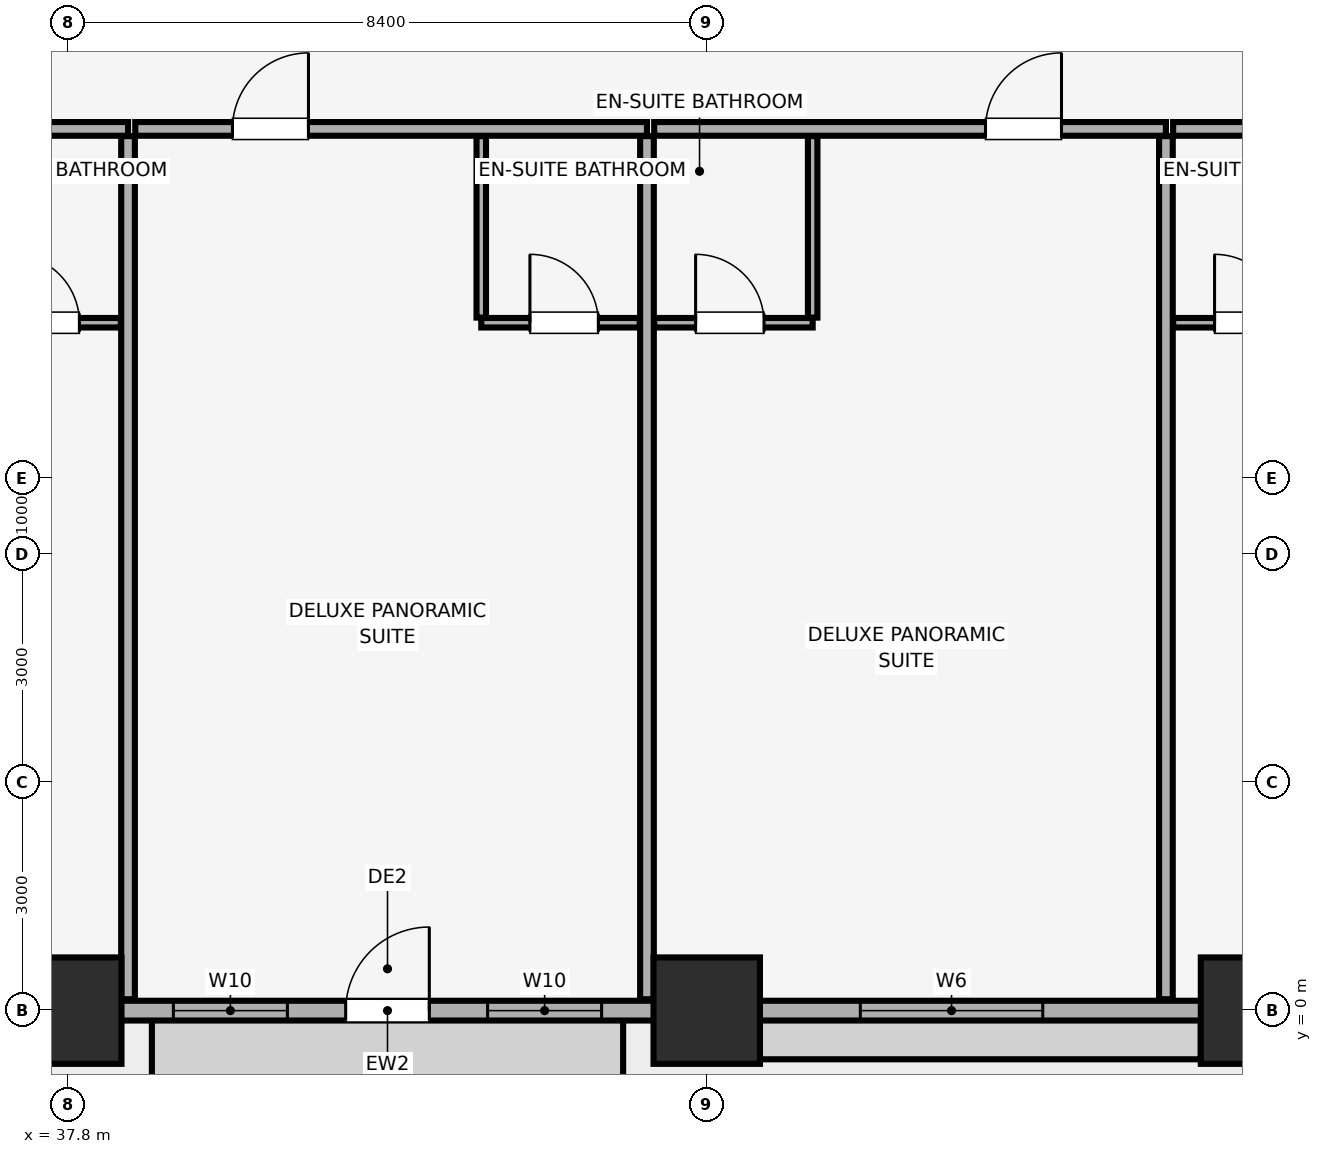
"""IFC4 building model, lengths in metres.
Left out: names, types, materials, properties, quantities, classifications, styles, units other than length and angle.
Written with IfcOpenShell. Run it as: python <this file> out.ifc"""

import sys

from ifc_helpers import new_model, si_unit, direction, frame, frame_2d, origin, origin_2d, place, context, subcontext, project, spatial, rectangle, extrude, element, fill, save


model = new_model("IFC4")
c1 = context("Model", 3, precision=1e-05, world=origin(), true_north=direction((0.0, 1.0)))
c2 = subcontext(c1, "Body", "Model", "MODEL_VIEW")
j1 = project(units=[si_unit("LENGTHUNIT", "METRE"), si_unit("PLANEANGLEUNIT", "RADIAN")], contexts=[c1])
p1 = place(None, origin())
s1 = spatial("IfcSite", under=j1, at=p1, CompositionType="ELEMENT")
p2 = place(p1, origin())
s2 = spatial("IfcBuilding", under=s1, at=p2, CompositionType="ELEMENT")
p3 = place(p2, frame((0.0, 0.0, 57.65)))
s3 = spatial("IfcBuildingStorey", under=s2, at=p3, CompositionType="ELEMENT", Elevation=57.65)
for number, where, z_axis, x_axis in (
    (1, (37.8, 0.0, 0.0), (0.0, 0.0, 1.0), (1.0, 0.0, 0.0)),
    (2, (46.2, 0.0, 0.0), (0.0, 0.0, 1.0), (1.0, 0.0, 0.0)),
    (3, (53.4, 0.0, 0.0), (0.0, 0.0, 1.0), (1.0, 0.0, 0.0)),
):
    element("IfcColumn", number, at=place(p3, frame(where, z_axis=z_axis, x_axis=x_axis)), inside=s3, PredefinedType="COLUMN", context=c2, shape_type="SweptSolid", body=[
        extrude(rectangle(XDim=1.4, YDim=1.4, at=origin_2d()), origin(), (0.0, 0.0, 1.0), 3.51),
    ])
p4 = place(p3, frame((4.2, 0.0, 0.0), z_axis=(0.0, 0.0, 1.0), x_axis=(1.0, 0.0, 0.0)))
e4 = element("IfcWall", 4, at=p4, inside=s3, PredefinedType="SOLIDWALL", context=c2, shape_type="SweptSolid", body=[
    extrude(rectangle(XDim=75.6, YDim=0.26, at=frame_2d((37.8, 0.0))), origin(), (0.0, 0.0, 1.0), 2.56),
])
p5 = place(p4, frame((21.383, 0.0, 0.0)))
e5 = element("IfcOpeningElement", 5, at=p5, cuts=e4, PredefinedType="OPENING", context=c2, shape_type="SweptSolid", body=[
    extrude(rectangle(XDim=1.1, YDim=2.15, at=frame_2d((0.55, 1.075))), frame((0.0, 0.14, 0.0), z_axis=(0.0, -1.0, 0.0), x_axis=(1.0, 0.0, 0.0)), (0.0, 0.0, 1.0), 0.28),
])
p6 = place(p4, frame((37.25, 0.0, 0.0)))
e6 = element("IfcOpeningElement", 6, at=p6, cuts=e4, PredefinedType="OPENING", context=c2, shape_type="SweptSolid", body=[
    extrude(rectangle(XDim=1.1, YDim=2.15, at=frame_2d((0.55, 1.075))), frame((0.0, 0.14, 0.0), z_axis=(0.0, -1.0, 0.0), x_axis=(1.0, 0.0, 0.0)), (0.0, 0.0, 1.0), 0.28),
])
p7 = place(p4, frame((53.117, 0.0, 0.0)))
e7 = element("IfcOpeningElement", 7, at=p7, cuts=e4, PredefinedType="OPENING", context=c2, shape_type="SweptSolid", body=[
    extrude(rectangle(XDim=1.1, YDim=2.15, at=frame_2d((0.55, 1.075))), frame((0.0, 0.14, 0.0), z_axis=(0.0, -1.0, 0.0), x_axis=(1.0, 0.0, 0.0)), (0.0, 0.0, 1.0), 0.28),
])
p8 = place(p4, frame((1.035, 0.0, 0.85)))
e8 = element("IfcOpeningElement", 8, at=p8, cuts=e4, PredefinedType="OPENING", context=c2, shape_type="SweptSolid", body=[
    extrude(rectangle(XDim=2.4, YDim=1.5, at=frame_2d((1.2, 0.75))), frame((0.0, 0.14, 0.0), z_axis=(0.0, -1.0, 0.0), x_axis=(1.0, 0.0, 0.0)), (0.0, 0.0, 1.0), 0.28),
])
p9 = place(p4, frame((8.138, 0.0, 0.85)))
e9 = element("IfcOpeningElement", 9, at=p9, cuts=e4, PredefinedType="OPENING", context=c2, shape_type="SweptSolid", body=[
    extrude(rectangle(XDim=2.4, YDim=1.5, at=frame_2d((1.2, 0.75))), frame((0.0, 0.14, 0.0), z_axis=(0.0, -1.0, 0.0), x_axis=(1.0, 0.0, 0.0)), (0.0, 0.0, 1.0), 0.28),
])
p10 = place(p4, frame((15.153, 0.0, 0.85)))
e10 = element("IfcOpeningElement", 10, at=p10, cuts=e4, PredefinedType="OPENING", context=c2, shape_type="SweptSolid", body=[
    extrude(rectangle(XDim=2.4, YDim=1.5, at=frame_2d((1.2, 0.75))), frame((0.0, 0.14, 0.0), z_axis=(0.0, -1.0, 0.0), x_axis=(1.0, 0.0, 0.0)), (0.0, 0.0, 1.0), 0.28),
])
p11 = place(p4, frame((23.127, 0.0, 0.85)))
e11 = element("IfcOpeningElement", 11, at=p11, cuts=e4, PredefinedType="OPENING", context=c2, shape_type="SweptSolid", body=[
    extrude(rectangle(XDim=2.4, YDim=1.5, at=frame_2d((1.2, 0.75))), frame((0.0, 0.14, 0.0), z_axis=(0.0, -1.0, 0.0), x_axis=(1.0, 0.0, 0.0)), (0.0, 0.0, 1.0), 0.28),
])
p12 = place(p4, frame((29.179, 0.0, 0.85)))
e12 = element("IfcOpeningElement", 12, at=p12, cuts=e4, PredefinedType="OPENING", context=c2, shape_type="SweptSolid", body=[
    extrude(rectangle(XDim=2.4, YDim=1.5, at=frame_2d((1.2, 0.75))), frame((0.0, 0.14, 0.0), z_axis=(0.0, -1.0, 0.0), x_axis=(1.0, 0.0, 0.0)), (0.0, 0.0, 1.0), 0.28),
])
p13 = place(p4, frame((34.983, 0.0, 0.85)))
e13 = element("IfcOpeningElement", 13, at=p13, cuts=e4, PredefinedType="OPENING", context=c2, shape_type="SweptSolid", body=[
    extrude(rectangle(XDim=1.5, YDim=1.4, at=frame_2d((0.75, 0.7))), frame((0.0, 0.14, 0.0), z_axis=(0.0, -1.0, 0.0), x_axis=(1.0, 0.0, 0.0)), (0.0, 0.0, 1.0), 0.28),
])
p14 = place(p4, frame((39.117, 0.0, 0.85)))
e14 = element("IfcOpeningElement", 14, at=p14, cuts=e4, PredefinedType="OPENING", context=c2, shape_type="SweptSolid", body=[
    extrude(rectangle(XDim=1.5, YDim=1.4, at=frame_2d((0.75, 0.7))), frame((0.0, 0.14, 0.0), z_axis=(0.0, -1.0, 0.0), x_axis=(1.0, 0.0, 0.0)), (0.0, 0.0, 1.0), 0.28),
])
p15 = place(p4, frame((44.021, 0.0, 0.85)))
e15 = element("IfcOpeningElement", 15, at=p15, cuts=e4, PredefinedType="OPENING", context=c2, shape_type="SweptSolid", body=[
    extrude(rectangle(XDim=2.4, YDim=1.5, at=frame_2d((1.2, 0.75))), frame((0.0, 0.14, 0.0), z_axis=(0.0, -1.0, 0.0), x_axis=(1.0, 0.0, 0.0)), (0.0, 0.0, 1.0), 0.28),
])
p16 = place(p4, frame((50.073, 0.0, 0.85)))
e16 = element("IfcOpeningElement", 16, at=p16, cuts=e4, PredefinedType="OPENING", context=c2, shape_type="SweptSolid", body=[
    extrude(rectangle(XDim=2.4, YDim=1.5, at=frame_2d((1.2, 0.75))), frame((0.0, 0.14, 0.0), z_axis=(0.0, -1.0, 0.0), x_axis=(1.0, 0.0, 0.0)), (0.0, 0.0, 1.0), 0.28),
])
p17 = place(p4, frame((58.048, 0.0, 0.85)))
e17 = element("IfcOpeningElement", 17, at=p17, cuts=e4, PredefinedType="OPENING", context=c2, shape_type="SweptSolid", body=[
    extrude(rectangle(XDim=2.4, YDim=1.5, at=frame_2d((1.2, 0.75))), frame((0.0, 0.14, 0.0), z_axis=(0.0, -1.0, 0.0), x_axis=(1.0, 0.0, 0.0)), (0.0, 0.0, 1.0), 0.28),
])
p18 = place(p4, frame((65.062, 0.0, 0.85)))
e18 = element("IfcOpeningElement", 18, at=p18, cuts=e4, PredefinedType="OPENING", context=c2, shape_type="SweptSolid", body=[
    extrude(rectangle(XDim=2.4, YDim=1.5, at=frame_2d((1.2, 0.75))), frame((0.0, 0.14, 0.0), z_axis=(0.0, -1.0, 0.0), x_axis=(1.0, 0.0, 0.0)), (0.0, 0.0, 1.0), 0.28),
])
p19 = place(p4, frame((72.165, 0.0, 0.85)))
e19 = element("IfcOpeningElement", 19, at=p19, cuts=e4, PredefinedType="OPENING", context=c2, shape_type="SweptSolid", body=[
    extrude(rectangle(XDim=2.4, YDim=1.5, at=frame_2d((1.2, 0.75))), frame((0.0, 0.14, 0.0), z_axis=(0.0, -1.0, 0.0), x_axis=(1.0, 0.0, 0.0)), (0.0, 0.0, 1.0), 0.28),
])
p20 = place(p3, frame((31.854, 11.6, 0.0), z_axis=(0.0, 0.0, 1.0), x_axis=(1.0, 0.0, 0.0)))
e20 = element("IfcWall", 20, at=p20, inside=s3, PredefinedType="PARTITIONING", context=c2, shape_type="SweptSolid", body=[
    extrude(rectangle(XDim=6.732, YDim=0.18, at=frame_2d((3.366, 0.0))), origin(), (0.0, 0.0, 1.0), 3.51),
])
p21 = place(p20, frame((1.279, 0.0, 0.0)))
e21 = element("IfcOpeningElement", 21, at=p21, cuts=e20, PredefinedType="OPENING", context=c2, shape_type="SweptSolid", body=[
    extrude(rectangle(XDim=1.0, YDim=2.15, at=frame_2d((0.5, 1.075))), frame((0.0, 0.1, 0.0), z_axis=(0.0, -1.0, 0.0), x_axis=(1.0, 0.0, 0.0)), (0.0, 0.0, 1.0), 0.2),
])
p22 = place(p3, frame((38.586, 0.15, 0.0), z_axis=(0.0, 0.0, 1.0), x_axis=(0.0, 1.0, 0.0)))
e22 = element("IfcWall", 22, at=p22, inside=s3, PredefinedType="PARTITIONING", context=c2, shape_type="SweptSolid", body=[
    extrude(rectangle(XDim=11.355, YDim=0.18, at=frame_2d((5.677, 0.0))), origin(), (0.0, 0.0, 1.0), 3.51),
])
p23 = place(p3, frame((36.406, 9.05, 0.0), z_axis=(0.0, 0.0, 1.0), x_axis=(1.0, 0.0, 0.0)))
e23 = element("IfcWall", 23, at=p23, inside=s3, PredefinedType="PARTITIONING", context=c2, shape_type="SweptSolid", body=[
    extrude(rectangle(XDim=2.085, YDim=0.125, at=frame_2d((1.042, 0.0))), origin(), (0.0, 0.0, 1.0), 3.51),
])
p24 = place(p23, frame((0.64, 0.0, 0.0)))
e24 = element("IfcOpeningElement", 24, at=p24, cuts=e23, PredefinedType="OPENING", context=c2, shape_type="SweptSolid", body=[
    extrude(rectangle(XDim=0.9, YDim=2.1, at=frame_2d((0.45, 1.05))), frame((0.0, 0.073, 0.0), z_axis=(0.0, -1.0, 0.0), x_axis=(1.0, 0.0, 0.0)), (0.0, 0.0, 1.0), 0.145),
])
p25 = place(p3, frame((38.681, 11.6, 0.0), z_axis=(0.0, 0.0, 1.0), x_axis=(1.0, 0.0, 0.0)))
e25 = element("IfcWall", 25, at=p25, inside=s3, PredefinedType="PARTITIONING", context=c2, shape_type="SweptSolid", body=[
    extrude(rectangle(XDim=6.732, YDim=0.18, at=frame_2d((3.366, 0.0))), origin(), (0.0, 0.0, 1.0), 3.51),
])
p26 = place(p25, frame((1.279, 0.0, 0.0)))
e26 = element("IfcOpeningElement", 26, at=p26, cuts=e25, PredefinedType="OPENING", context=c2, shape_type="SweptSolid", body=[
    extrude(rectangle(XDim=1.0, YDim=2.15, at=frame_2d((0.5, 1.075))), frame((0.0, 0.1, 0.0), z_axis=(0.0, -1.0, 0.0), x_axis=(1.0, 0.0, 0.0)), (0.0, 0.0, 1.0), 0.2),
])
p27 = place(p3, frame((45.414, 0.15, 0.0), z_axis=(0.0, 0.0, 1.0), x_axis=(0.0, 1.0, 0.0)))
e27 = element("IfcWall", 27, at=p27, inside=s3, PredefinedType="PARTITIONING", context=c2, shape_type="SweptSolid", body=[
    extrude(rectangle(XDim=11.355, YDim=0.18, at=frame_2d((5.677, 0.0))), origin(), (0.0, 0.0, 1.0), 3.51),
])
p28 = place(p3, frame((43.234, 9.05, 0.0), z_axis=(0.0, 0.0, 1.0), x_axis=(1.0, 0.0, 0.0)))
e28 = element("IfcWall", 28, at=p28, inside=s3, PredefinedType="PARTITIONING", context=c2, shape_type="SweptSolid", body=[
    extrude(rectangle(XDim=2.085, YDim=0.125, at=frame_2d((1.042, 0.0))), origin(), (0.0, 0.0, 1.0), 3.51),
])
p29 = place(p28, frame((0.64, 0.0, 0.0)))
e29 = element("IfcOpeningElement", 29, at=p29, cuts=e28, PredefinedType="OPENING", context=c2, shape_type="SweptSolid", body=[
    extrude(rectangle(XDim=0.9, YDim=2.1, at=frame_2d((0.45, 1.05))), frame((0.0, 0.073, 0.0), z_axis=(0.0, -1.0, 0.0), x_axis=(1.0, 0.0, 0.0)), (0.0, 0.0, 1.0), 0.145),
])
p30 = place(p3, frame((43.234, 9.117, 0.0), z_axis=(0.0, 0.0, 1.0), x_axis=(0.0, 1.0, 0.0)))
e30 = element("IfcWall", 30, at=p30, inside=s3, PredefinedType="PARTITIONING", context=c2, shape_type="SweptSolid", body=[
    extrude(rectangle(XDim=2.387, YDim=0.125, at=frame_2d((1.194, 0.0))), origin(), (0.0, 0.0, 1.0), 3.51),
])
p31 = place(p3, frame((45.509, 11.6, 0.0), z_axis=(0.0, 0.0, 1.0), x_axis=(1.0, 0.0, 0.0)))
e31 = element("IfcWall", 31, at=p31, inside=s3, PredefinedType="PARTITIONING", context=c2, shape_type="SweptSolid", body=[
    extrude(rectangle(XDim=6.732, YDim=0.18, at=frame_2d((3.366, 0.0))), origin(), (0.0, 0.0, 1.0), 3.51),
])
p32 = place(p31, frame((4.359, 0.0, 0.0)))
e32 = element("IfcOpeningElement", 32, at=p32, cuts=e31, PredefinedType="OPENING", context=c2, shape_type="SweptSolid", body=[
    extrude(rectangle(XDim=1.0, YDim=2.15, at=frame_2d((0.5, 1.075))), frame((0.0, 0.1, 0.0), z_axis=(0.0, -1.0, 0.0), x_axis=(1.0, 0.0, 0.0)), (0.0, 0.0, 1.0), 0.2),
])
p33 = place(p3, frame((52.241, 0.15, 0.0), z_axis=(0.0, 0.0, 1.0), x_axis=(0.0, 1.0, 0.0)))
e33 = element("IfcWall", 33, at=p33, inside=s3, PredefinedType="PARTITIONING", context=c2, shape_type="SweptSolid", body=[
    extrude(rectangle(XDim=11.355, YDim=0.18, at=frame_2d((5.677, 0.0))), origin(), (0.0, 0.0, 1.0), 3.51),
])
p34 = place(p3, frame((45.509, 9.05, 0.0), z_axis=(0.0, 0.0, 1.0), x_axis=(1.0, 0.0, 0.0)))
e34 = element("IfcWall", 34, at=p34, inside=s3, PredefinedType="PARTITIONING", context=c2, shape_type="SweptSolid", body=[
    extrude(rectangle(XDim=2.085, YDim=0.125, at=frame_2d((1.042, 0.0))), origin(), (0.0, 0.0, 1.0), 3.51),
])
p35 = place(p34, frame((0.545, 0.0, 0.0)))
e35 = element("IfcOpeningElement", 35, at=p35, cuts=e34, PredefinedType="OPENING", context=c2, shape_type="SweptSolid", body=[
    extrude(rectangle(XDim=0.9, YDim=2.1, at=frame_2d((0.45, 1.05))), frame((0.0, 0.073, 0.0), z_axis=(0.0, -1.0, 0.0), x_axis=(1.0, 0.0, 0.0)), (0.0, 0.0, 1.0), 0.145),
])
p36 = place(p3, frame((47.594, 9.117, 0.0), z_axis=(0.0, 0.0, 1.0), x_axis=(0.0, 1.0, 0.0)))
e36 = element("IfcWall", 36, at=p36, inside=s3, PredefinedType="PARTITIONING", context=c2, shape_type="SweptSolid", body=[
    extrude(rectangle(XDim=2.387, YDim=0.125, at=frame_2d((1.194, 0.0))), origin(), (0.0, 0.0, 1.0), 3.51),
])
p37 = place(p3, frame((52.336, 11.6, 0.0), z_axis=(0.0, 0.0, 1.0), x_axis=(1.0, 0.0, 0.0)))
e37 = element("IfcWall", 37, at=p37, inside=s3, PredefinedType="PARTITIONING", context=c2, shape_type="SweptSolid", body=[
    extrude(rectangle(XDim=6.732, YDim=0.18, at=frame_2d((3.366, 0.0))), origin(), (0.0, 0.0, 1.0), 3.51),
])
p38 = place(p37, frame((4.359, 0.0, 0.0)))
e38 = element("IfcOpeningElement", 38, at=p38, cuts=e37, PredefinedType="OPENING", context=c2, shape_type="SweptSolid", body=[
    extrude(rectangle(XDim=1.0, YDim=2.15, at=frame_2d((0.5, 1.075))), frame((0.0, 0.1, 0.0), z_axis=(0.0, -1.0, 0.0), x_axis=(1.0, 0.0, 0.0)), (0.0, 0.0, 1.0), 0.2),
])
p39 = place(p3, frame((52.336, 9.05, 0.0), z_axis=(0.0, 0.0, 1.0), x_axis=(1.0, 0.0, 0.0)))
e39 = element("IfcWall", 39, at=p39, inside=s3, PredefinedType="PARTITIONING", context=c2, shape_type="SweptSolid", body=[
    extrude(rectangle(XDim=2.085, YDim=0.125, at=frame_2d((1.042, 0.0))), origin(), (0.0, 0.0, 1.0), 3.51),
])
p40 = place(p39, frame((0.545, 0.0, 0.0)))
e40 = element("IfcOpeningElement", 40, at=p40, cuts=e39, PredefinedType="OPENING", context=c2, shape_type="SweptSolid", body=[
    extrude(rectangle(XDim=0.9, YDim=2.1, at=frame_2d((0.45, 1.05))), frame((0.0, 0.073, 0.0), z_axis=(0.0, -1.0, 0.0), x_axis=(1.0, 0.0, 0.0)), (0.0, 0.0, 1.0), 0.145),
])
p41 = place(p6, origin())
e41 = element("IfcDoor", 41, at=p41, inside=s3, OperationType="SINGLE_SWING_RIGHT", PredefinedType="DOOR", context=c2, shape_type="SweptSolid", body=[
    extrude(rectangle(XDim=1.1, YDim=2.15, at=frame_2d((0.55, 1.075))), frame((0.0, 0.025, 0.0), z_axis=(0.0, -1.0, 0.0), x_axis=(1.0, 0.0, 0.0)), (0.0, 0.0, 1.0), 0.05),
])
fill(e6, e41)
p42 = place(p13, origin())
e42 = element("IfcWindow", 42, at=p42, inside=s3, PartitioningType="SINGLE_PANEL", PredefinedType="WINDOW", context=c2, shape_type="SweptSolid", body=[
    extrude(rectangle(XDim=1.5, YDim=1.4, at=frame_2d((0.75, 0.7))), frame((0.0, 0.03, 0.0), z_axis=(0.0, -1.0, 0.0), x_axis=(1.0, 0.0, 0.0)), (0.0, 0.0, 1.0), 0.06),
])
fill(e13, e42)
p43 = place(p14, origin())
e43 = element("IfcWindow", 43, at=p43, inside=s3, PartitioningType="SINGLE_PANEL", PredefinedType="WINDOW", context=c2, shape_type="SweptSolid", body=[
    extrude(rectangle(XDim=1.5, YDim=1.4, at=frame_2d((0.75, 0.7))), frame((0.0, 0.03, 0.0), z_axis=(0.0, -1.0, 0.0), x_axis=(1.0, 0.0, 0.0)), (0.0, 0.0, 1.0), 0.06),
])
fill(e14, e43)
p44 = place(p15, origin())
e44 = element("IfcWindow", 44, at=p44, inside=s3, PartitioningType="SINGLE_PANEL", PredefinedType="WINDOW", context=c2, shape_type="SweptSolid", body=[
    extrude(rectangle(XDim=2.4, YDim=1.5, at=frame_2d((1.2, 0.75))), frame((0.0, 0.03, 0.0), z_axis=(0.0, -1.0, 0.0), x_axis=(1.0, 0.0, 0.0)), (0.0, 0.0, 1.0), 0.06),
])
fill(e15, e44)
p45 = place(p24, origin())
e45 = element("IfcDoor", 45, at=p45, inside=s3, OperationType="SINGLE_SWING_LEFT", PredefinedType="DOOR", context=c2, shape_type="SweptSolid", body=[
    extrude(rectangle(XDim=0.9, YDim=2.1, at=frame_2d((0.45, 1.05))), frame((0.0, 0.025, 0.0), z_axis=(0.0, -1.0, 0.0), x_axis=(1.0, 0.0, 0.0)), (0.0, 0.0, 1.0), 0.05),
])
fill(e24, e45)
p46 = place(p26, origin())
e46 = element("IfcDoor", 46, at=p46, inside=s3, OperationType="SINGLE_SWING_RIGHT", PredefinedType="DOOR", context=c2, shape_type="SweptSolid", body=[
    extrude(rectangle(XDim=1.0, YDim=2.15, at=frame_2d((0.5, 1.075))), frame((0.0, 0.025, 0.0), z_axis=(0.0, -1.0, 0.0), x_axis=(1.0, 0.0, 0.0)), (0.0, 0.0, 1.0), 0.05),
])
fill(e26, e46)
p47 = place(p29, origin())
e47 = element("IfcDoor", 47, at=p47, inside=s3, OperationType="SINGLE_SWING_LEFT", PredefinedType="DOOR", context=c2, shape_type="SweptSolid", body=[
    extrude(rectangle(XDim=0.9, YDim=2.1, at=frame_2d((0.45, 1.05))), frame((0.0, 0.025, 0.0), z_axis=(0.0, -1.0, 0.0), x_axis=(1.0, 0.0, 0.0)), (0.0, 0.0, 1.0), 0.05),
])
fill(e29, e47)
p48 = place(p32, origin())
e48 = element("IfcDoor", 48, at=p48, inside=s3, OperationType="SINGLE_SWING_RIGHT", PredefinedType="DOOR", context=c2, shape_type="SweptSolid", body=[
    extrude(rectangle(XDim=1.0, YDim=2.15, at=frame_2d((0.5, 1.075))), frame((0.0, 0.025, 0.0), z_axis=(0.0, -1.0, 0.0), x_axis=(1.0, 0.0, 0.0)), (0.0, 0.0, 1.0), 0.05),
])
fill(e32, e48)
p49 = place(p35, origin())
e49 = element("IfcDoor", 49, at=p49, inside=s3, OperationType="SINGLE_SWING_LEFT", PredefinedType="DOOR", context=c2, shape_type="SweptSolid", body=[
    extrude(rectangle(XDim=0.9, YDim=2.1, at=frame_2d((0.45, 1.05))), frame((0.0, 0.025, 0.0), z_axis=(0.0, -1.0, 0.0), x_axis=(1.0, 0.0, 0.0)), (0.0, 0.0, 1.0), 0.05),
])
fill(e35, e49)
p50 = place(p40, origin())
e50 = element("IfcDoor", 50, at=p50, inside=s3, OperationType="SINGLE_SWING_LEFT", PredefinedType="DOOR", context=c2, shape_type="SweptSolid", body=[
    extrude(rectangle(XDim=0.9, YDim=2.1, at=frame_2d((0.45, 1.05))), frame((0.0, 0.025, 0.0), z_axis=(0.0, -1.0, 0.0), x_axis=(1.0, 0.0, 0.0)), (0.0, 0.0, 1.0), 0.05),
])
fill(e40, e50)
save(model, sys.argv[1])
